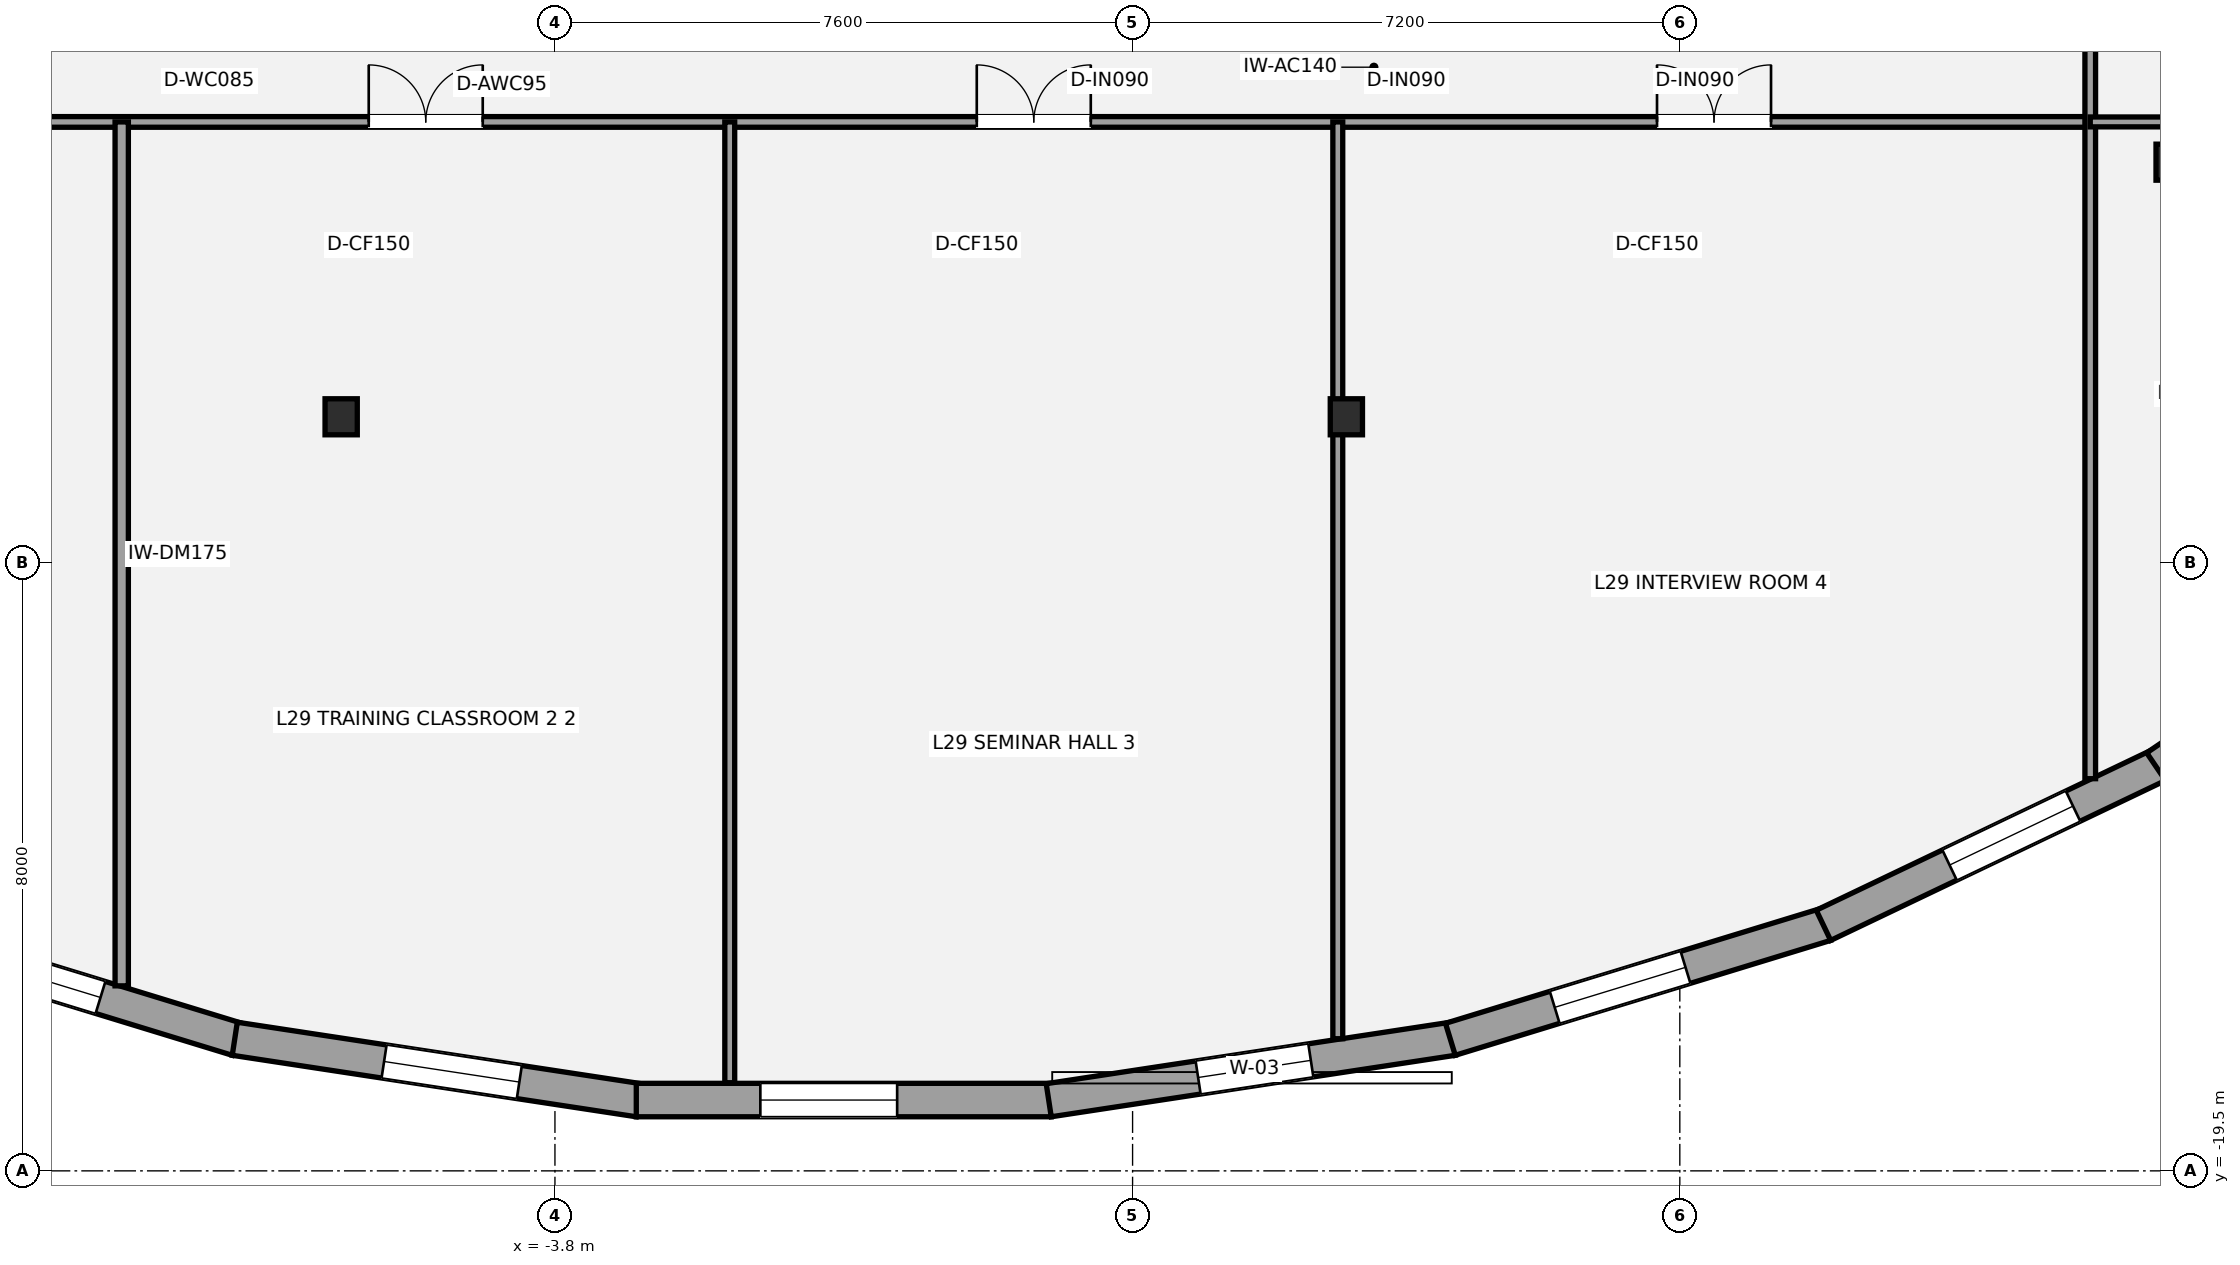
"""IFC4 building model, lengths in metres.
Left out: names, types, materials, properties, quantities, classifications, styles, units other than length and angle.
Written with IfcOpenShell. Run it as: python <this file> out.ifc"""

import sys

from ifc_helpers import new_model, si_unit, direction, frame, frame_2d, origin, origin_2d, place, context, subcontext, project, spatial, rectangle, i_section, extrude, element, fill, save


model = new_model("IFC4")
c1 = context("Model", 3, precision=1e-05, world=origin(), true_north=direction((0.0, 1.0)))
c2 = subcontext(c1, "Body", "Model", "MODEL_VIEW")
j1 = project(units=[si_unit("LENGTHUNIT", "METRE"), si_unit("PLANEANGLEUNIT", "RADIAN")], contexts=[c1])
p1 = place(None, origin())
s1 = spatial("IfcSite", under=j1, at=p1, CompositionType="ELEMENT")
p2 = place(p1, origin())
s2 = spatial("IfcBuilding", under=s1, at=p2, CompositionType="ELEMENT")
p3 = place(p2, frame((0.0, 0.0, 110.6)))
s3 = spatial("IfcBuildingStorey", under=s2, at=p3, CompositionType="ELEMENT", Elevation=110.6)
for number, where, z_axis, x_axis in (
    (1, (-6.613, -9.579, 0.0), (0.0, 0.0, 1.0), (1.0, 0.0, 0.0)),
    (2, (6.613, -9.579, 0.0), (0.0, 0.0, 1.0), (1.0, 0.0, 0.0)),
    (3, (17.477, -6.229, 0.0), (0.0, 0.0, 1.0), (1.0, 0.0, 0.0)),
):
    element("IfcColumn", number, at=place(p3, frame(where, z_axis=z_axis, x_axis=x_axis)), inside=s3, PredefinedType="COLUMN", context=c2, shape_type="SweptSolid", body=[
        extrude(i_section(OverallWidth=0.424, OverallDepth=0.474, WebThickness=0.048, FlangeThickness=0.077, at=origin_2d()), origin(), (0.0, 0.0, 1.0), 3.5),
    ])
p4 = place(p3, frame((-7.981, -17.769, 0.0), z_axis=(0.0, 0.0, 1.0), x_axis=(-0.956228569431, 0.292620783617, 0.0)))
e4 = element("IfcWall", 4, at=p4, inside=s3, PredefinedType="STANDARD", context=c2, shape_type="SweptSolid", body=[
    extrude(rectangle(XDim=5.165, YDim=0.44, at=frame_2d((2.583, 0.0))), origin(), (0.0, 0.0, 1.0), 2.528),
])
p5 = place(p4, frame((1.88, 0.0, 0.65)))
e5 = element("IfcOpeningElement", 5, at=p5, cuts=e4, PredefinedType="OPENING", context=c2, shape_type="SweptSolid", body=[
    extrude(rectangle(XDim=1.8, YDim=1.7, at=frame_2d((0.9, 0.85))), frame((0.0, 0.23, 0.0), z_axis=(0.0, -1.0, 0.0), x_axis=(1.0, 0.0, 0.0)), (0.0, 0.0, 1.0), 0.46),
])
p6 = place(p3, frame((-2.697, -18.571, 0.0), z_axis=(0.0, 0.0, 1.0), x_axis=(-0.988627497469, 0.150385076545, 0.0)))
e6 = element("IfcWall", 6, at=p6, inside=s3, PredefinedType="STANDARD", context=c2, shape_type="SweptSolid", body=[
    extrude(rectangle(XDim=5.377, YDim=0.44, at=frame_2d((2.688, 0.0))), origin(), (0.0, 0.0, 1.0), 2.528),
])
p7 = place(p6, frame((1.59, 0.0, 0.65)))
e7 = element("IfcOpeningElement", 7, at=p7, cuts=e6, PredefinedType="OPENING", context=c2, shape_type="SweptSolid", body=[
    extrude(rectangle(XDim=1.8, YDim=1.7, at=frame_2d((0.9, 0.85))), frame((0.0, 0.23, 0.0), z_axis=(0.0, -1.0, 0.0), x_axis=(1.0, 0.0, 0.0)), (0.0, 0.0, 1.0), 0.46),
])
p8 = place(p3, frame((2.73, -18.568, 0.0), z_axis=(0.0, 0.0, 1.0), x_axis=(-1.0, 0.0, 0.0)))
e8 = element("IfcWall", 8, at=p8, inside=s3, PredefinedType="STANDARD", context=c2, shape_type="SweptSolid", body=[
    extrude(rectangle(XDim=5.459, YDim=0.44, at=frame_2d((2.73, 0.0))), origin(), (0.0, 0.0, 1.0), 2.528),
])
p9 = place(p8, frame((2.027, 0.0, 0.65)))
e9 = element("IfcOpeningElement", 9, at=p9, cuts=e8, PredefinedType="OPENING", context=c2, shape_type="SweptSolid", body=[
    extrude(rectangle(XDim=1.8, YDim=1.7, at=frame_2d((0.9, 0.85))), frame((0.0, 0.23, 0.0), z_axis=(0.0, -1.0, 0.0), x_axis=(1.0, 0.0, 0.0)), (0.0, 0.0, 1.0), 0.46),
])
p10 = place(p3, frame((8.012, -17.762, 0.0), z_axis=(0.0, 0.0, 1.0), x_axis=(-0.988627497469, -0.150385076545, 0.0)))
e10 = element("IfcWall", 10, at=p10, inside=s3, PredefinedType="STANDARD", context=c2, shape_type="SweptSolid", body=[
    extrude(rectangle(XDim=5.377, YDim=0.44, at=frame_2d((2.688, 0.0))), origin(), (0.0, 0.0, 1.0), 2.528),
])
p11 = place(p10, frame((1.889, 0.0, 0.65)))
e11 = element("IfcOpeningElement", 11, at=p11, cuts=e10, PredefinedType="OPENING", context=c2, shape_type="SweptSolid", body=[
    extrude(rectangle(XDim=1.5, YDim=1.7, at=frame_2d((0.75, 0.85))), frame((0.0, 0.23, 0.0), z_axis=(0.0, -1.0, 0.0), x_axis=(1.0, 0.0, 0.0)), (0.0, 0.0, 1.0), 0.46),
])
p12 = place(p3, frame((12.92, -16.258, 0.0), z_axis=(0.0, 0.0, 1.0), x_axis=(-0.956228569431, -0.292620783617, 0.0)))
e12 = element("IfcWall", 12, at=p12, inside=s3, PredefinedType="STANDARD", context=c2, shape_type="SweptSolid", body=[
    extrude(rectangle(XDim=5.165, YDim=0.44, at=frame_2d((2.583, 0.0))), origin(), (0.0, 0.0, 1.0), 2.528),
])
p13 = place(p12, frame((1.93, 0.0, 0.65)))
e13 = element("IfcOpeningElement", 13, at=p13, cuts=e12, PredefinedType="OPENING", context=c2, shape_type="SweptSolid", body=[
    extrude(rectangle(XDim=1.8, YDim=1.7, at=frame_2d((0.9, 0.85))), frame((0.0, 0.23, 0.0), z_axis=(0.0, -1.0, 0.0), x_axis=(1.0, 0.0, 0.0)), (0.0, 0.0, 1.0), 0.46),
])
p14 = place(p3, frame((17.295, -14.166, 0.0), z_axis=(0.0, 0.0, 1.0), x_axis=(-0.902372757907, -0.430956385018, 0.0)))
e14 = element("IfcWall", 14, at=p14, inside=s3, PredefinedType="STANDARD", context=c2, shape_type="SweptSolid", body=[
    extrude(rectangle(XDim=4.882, YDim=0.44, at=frame_2d((2.441, 0.0))), origin(), (0.0, 0.0, 1.0), 2.528),
])
p15 = place(p14, frame((1.243, 0.0, 0.65)))
e15 = element("IfcOpeningElement", 15, at=p15, cuts=e14, PredefinedType="OPENING", context=c2, shape_type="SweptSolid", body=[
    extrude(rectangle(XDim=1.8, YDim=1.7, at=frame_2d((0.9, 0.85))), frame((0.0, 0.23, 0.0), z_axis=(0.0, -1.0, 0.0), x_axis=(1.0, 0.0, 0.0)), (0.0, 0.0, 1.0), 0.46),
])
p16 = place(p3, frame((21.066, -11.606, 0.0), z_axis=(0.0, 0.0, 1.0), x_axis=(-0.827754551165, -0.56109036975, 0.0)))
e16 = element("IfcWall", 16, at=p16, inside=s3, PredefinedType="STANDARD", context=c2, shape_type="SweptSolid", body=[
    extrude(rectangle(XDim=4.591, YDim=0.44, at=frame_2d((2.295, 0.0))), origin(), (0.0, 0.0, 1.0), 2.528),
])
p17 = place(p16, frame((1.794, 0.0, 0.65)))
e17 = element("IfcOpeningElement", 17, at=p17, cuts=e16, PredefinedType="OPENING", context=c2, shape_type="SweptSolid", body=[
    extrude(rectangle(XDim=1.8, YDim=1.7, at=frame_2d((0.9, 0.85))), frame((0.0, 0.23, 0.0), z_axis=(0.0, -1.0, 0.0), x_axis=(1.0, 0.0, 0.0)), (0.0, 0.0, 1.0), 0.46),
])
p18 = place(p3, frame((-17.8, -5.7, 0.0), z_axis=(0.0, 0.0, 1.0), x_axis=(1.0, 0.0, 0.0)))
e18 = element("IfcWall", 18, at=p18, inside=s3, PredefinedType="PARTITIONING", context=c2, shape_type="SweptSolid", body=[
    extrude(rectangle(XDim=34.2, YDim=0.14, at=frame_2d((17.1, 0.0))), origin(), (0.0, 0.0, 1.0), 2.688),
])
p19 = place(p18, frame((3.4, 0.0, 0.0)))
e19 = element("IfcOpeningElement", 19, at=p19, cuts=e18, PredefinedType="OPENING", context=c2, shape_type="SweptSolid", body=[
    extrude(rectangle(XDim=1.5, YDim=2.15, at=frame_2d((0.75, 1.075))), frame((0.0, 0.08, 0.0), z_axis=(0.0, -1.0, 0.0), x_axis=(1.0, 0.0, 0.0)), (0.0, 0.0, 1.0), 0.16),
])
p20 = place(p18, frame((11.55, 0.0, 0.0)))
e20 = element("IfcOpeningElement", 20, at=p20, cuts=e18, PredefinedType="OPENING", context=c2, shape_type="SweptSolid", body=[
    extrude(rectangle(XDim=1.5, YDim=2.15, at=frame_2d((0.75, 1.075))), frame((0.0, 0.08, 0.0), z_axis=(0.0, -1.0, 0.0), x_axis=(1.0, 0.0, 0.0)), (0.0, 0.0, 1.0), 0.16),
])
p21 = place(p18, frame((19.55, 0.0, 0.0)))
e21 = element("IfcOpeningElement", 21, at=p21, cuts=e18, PredefinedType="OPENING", context=c2, shape_type="SweptSolid", body=[
    extrude(rectangle(XDim=1.5, YDim=2.15, at=frame_2d((0.75, 1.075))), frame((0.0, 0.08, 0.0), z_axis=(0.0, -1.0, 0.0), x_axis=(1.0, 0.0, 0.0)), (0.0, 0.0, 1.0), 0.16),
])
p22 = place(p18, frame((28.5, 0.0, 0.0)))
e22 = element("IfcOpeningElement", 22, at=p22, cuts=e18, PredefinedType="OPENING", context=c2, shape_type="SweptSolid", body=[
    extrude(rectangle(XDim=1.5, YDim=2.15, at=frame_2d((0.75, 1.075))), frame((0.0, 0.08, 0.0), z_axis=(0.0, -1.0, 0.0), x_axis=(1.0, 0.0, 0.0)), (0.0, 0.0, 1.0), 0.16),
])
p23 = place(p3, frame((16.4, -14.341, 0.0), z_axis=(0.0, 0.0, 1.0), x_axis=(0.0, 1.0, 0.0)))
e23 = element("IfcWall", 23, at=p23, inside=s3, PredefinedType="PARTITIONING", context=c2, shape_type="SweptSolid", body=[
    extrude(rectangle(XDim=21.891, YDim=0.14, at=frame_2d((10.945, 0.0))), origin(), (0.0, 0.0, 1.0), 2.763),
])
p24 = place(p23, frame((11.44, 0.0, 0.0)))
e24 = element("IfcOpeningElement", 24, at=p24, cuts=e23, PredefinedType="OPENING", context=c2, shape_type="SweptSolid", body=[
    extrude(rectangle(XDim=0.9, YDim=2.1, at=frame_2d((0.45, 1.05))), frame((0.0, 0.08, 0.0), z_axis=(0.0, -1.0, 0.0), x_axis=(1.0, 0.0, 0.0)), (0.0, 0.0, 1.0), 0.16),
])
p25 = place(p23, frame((16.59, 0.0, 0.0)))
e25 = element("IfcOpeningElement", 25, at=p25, cuts=e23, PredefinedType="OPENING", context=c2, shape_type="SweptSolid", body=[
    extrude(rectangle(XDim=0.9, YDim=2.1, at=frame_2d((0.45, 1.05))), frame((0.0, 0.08, 0.0), z_axis=(0.0, -1.0, 0.0), x_axis=(1.0, 0.0, 0.0)), (0.0, 0.0, 1.0), 0.16),
])
p26 = place(p23, frame((19.965, 0.0, 0.0)))
e26 = element("IfcOpeningElement", 26, at=p26, cuts=e23, PredefinedType="OPENING", context=c2, shape_type="SweptSolid", body=[
    extrude(rectangle(XDim=0.9, YDim=2.1, at=frame_2d((0.45, 1.05))), frame((0.0, 0.08, 0.0), z_axis=(0.0, -1.0, 0.0), x_axis=(1.0, 0.0, 0.0)), (0.0, 0.0, 1.0), 0.16),
])
p27 = place(p3, frame((-9.5, -17.066, 0.0), z_axis=(0.0, 0.0, 1.0), x_axis=(0.0, 1.0, 0.0)))
e27 = element("IfcWall", 27, at=p27, inside=s3, PredefinedType="PARTITIONING", context=c2, shape_type="SweptSolid", body=[
    extrude(rectangle(XDim=11.366, YDim=0.175, at=frame_2d((5.683, 0.0))), origin(), (0.0, 0.0, 1.0), 2.763),
])
p28 = place(p3, frame((-1.5, -18.34, 0.0), z_axis=(0.0, 0.0, 1.0), x_axis=(0.0, 1.0, 0.0)))
e28 = element("IfcWall", 28, at=p28, inside=s3, PredefinedType="PARTITIONING", context=c2, shape_type="SweptSolid", body=[
    extrude(rectangle(XDim=12.64, YDim=0.13, at=frame_2d((6.32, 0.0))), origin(), (0.0, 0.0, 1.0), 2.763),
])
p29 = place(p3, frame((6.5, -17.762, 0.0), z_axis=(0.0, 0.0, 1.0), x_axis=(0.0, 1.0, 0.0)))
e29 = element("IfcWall", 29, at=p29, inside=s3, PredefinedType="PARTITIONING", context=c2, shape_type="SweptSolid", body=[
    extrude(rectangle(XDim=12.062, YDim=0.13, at=frame_2d((6.031, 0.0))), origin(), (0.0, 0.0, 1.0), 2.763),
])
p30 = place(p3, frame((16.4, -5.7, 0.0), z_axis=(0.0, 0.0, 1.0), x_axis=(1.0, 0.0, 0.0)))
e30 = element("IfcWall", 30, at=p30, inside=s3, PredefinedType="PARTITIONING", context=c2, shape_type="SweptSolid", body=[
    extrude(rectangle(XDim=9.421, YDim=0.13, at=frame_2d((4.71, 0.0))), origin(), (0.0, 0.0, 1.0), 2.688),
])
p31 = place(p30, frame((1.49, 0.0, 0.0)))
e31 = element("IfcOpeningElement", 31, at=p31, cuts=e30, PredefinedType="OPENING", context=c2, shape_type="SweptSolid", body=[
    extrude(rectangle(XDim=0.9, YDim=2.1, at=frame_2d((0.45, 1.05))), frame((0.0, 0.075, 0.0), z_axis=(0.0, -1.0, 0.0), x_axis=(1.0, 0.0, 0.0)), (0.0, 0.0, 1.0), 0.15),
])
p32 = place(p5, origin())
e32 = element("IfcWindow", 32, at=p32, inside=s3, PartitioningType="SINGLE_PANEL", PredefinedType="WINDOW", context=c2, shape_type="SweptSolid", body=[
    extrude(rectangle(XDim=1.8, YDim=1.7, at=frame_2d((0.9, 0.85))), frame((0.0, -0.01, 0.0), z_axis=(0.0, -1.0, 0.0), x_axis=(1.0, 0.0, 0.0)), (0.0, 0.0, 1.0), 0.06),
])
fill(e5, e32)
p33 = place(p7, origin())
e33 = element("IfcWindow", 33, at=p33, inside=s3, PartitioningType="SINGLE_PANEL", PredefinedType="WINDOW", context=c2, shape_type="SweptSolid", body=[
    extrude(rectangle(XDim=1.8, YDim=1.7, at=frame_2d((0.9, 0.85))), frame((0.0, -0.01, 0.0), z_axis=(0.0, -1.0, 0.0), x_axis=(1.0, 0.0, 0.0)), (0.0, 0.0, 1.0), 0.06),
])
fill(e7, e33)
p34 = place(p9, origin())
e34 = element("IfcWindow", 34, at=p34, inside=s3, PartitioningType="SINGLE_PANEL", PredefinedType="WINDOW", context=c2, shape_type="SweptSolid", body=[
    extrude(rectangle(XDim=1.8, YDim=1.7, at=frame_2d((0.9, 0.85))), frame((0.0, -0.01, 0.0), z_axis=(0.0, -1.0, 0.0), x_axis=(1.0, 0.0, 0.0)), (0.0, 0.0, 1.0), 0.06),
])
fill(e9, e34)
p35 = place(p11, origin())
e35 = element("IfcWindow", 35, at=p35, inside=s3, PartitioningType="SINGLE_PANEL", PredefinedType="WINDOW", context=c2, shape_type="SweptSolid", body=[
    extrude(rectangle(XDim=1.5, YDim=1.7, at=frame_2d((0.75, 0.85))), frame((0.0, -0.01, 0.0), z_axis=(0.0, -1.0, 0.0), x_axis=(1.0, 0.0, 0.0)), (0.0, 0.0, 1.0), 0.06),
])
fill(e11, e35)
p36 = place(p13, origin())
e36 = element("IfcWindow", 36, at=p36, inside=s3, PartitioningType="SINGLE_PANEL", PredefinedType="WINDOW", context=c2, shape_type="SweptSolid", body=[
    extrude(rectangle(XDim=1.8, YDim=1.7, at=frame_2d((0.9, 0.85))), frame((0.0, -0.01, 0.0), z_axis=(0.0, -1.0, 0.0), x_axis=(1.0, 0.0, 0.0)), (0.0, 0.0, 1.0), 0.06),
])
fill(e13, e36)
p37 = place(p15, origin())
e37 = element("IfcWindow", 37, at=p37, inside=s3, PartitioningType="SINGLE_PANEL", PredefinedType="WINDOW", context=c2, shape_type="SweptSolid", body=[
    extrude(rectangle(XDim=1.8, YDim=1.7, at=frame_2d((0.9, 0.85))), frame((0.0, -0.01, 0.0), z_axis=(0.0, -1.0, 0.0), x_axis=(1.0, 0.0, 0.0)), (0.0, 0.0, 1.0), 0.06),
])
fill(e15, e37)
p38 = place(p20, origin())
e38 = element("IfcDoor", 38, at=p38, inside=s3, OperationType="DOUBLE_DOOR_SINGLE_SWING", PredefinedType="DOOR", context=c2, shape_type="SweptSolid", body=[
    extrude(rectangle(XDim=1.5, YDim=2.15, at=frame_2d((0.75, 1.075))), frame((0.0, 0.025, 0.0), z_axis=(0.0, -1.0, 0.0), x_axis=(1.0, 0.0, 0.0)), (0.0, 0.0, 1.0), 0.05),
])
fill(e20, e38)
p39 = place(p21, origin())
e39 = element("IfcDoor", 39, at=p39, inside=s3, OperationType="DOUBLE_DOOR_SINGLE_SWING", PredefinedType="DOOR", context=c2, shape_type="SweptSolid", body=[
    extrude(rectangle(XDim=1.5, YDim=2.15, at=frame_2d((0.75, 1.075))), frame((0.0, 0.025, 0.0), z_axis=(0.0, -1.0, 0.0), x_axis=(1.0, 0.0, 0.0)), (0.0, 0.0, 1.0), 0.05),
])
fill(e21, e39)
p40 = place(p22, origin())
e40 = element("IfcDoor", 40, at=p40, inside=s3, OperationType="DOUBLE_DOOR_SINGLE_SWING", PredefinedType="DOOR", context=c2, shape_type="SweptSolid", body=[
    extrude(rectangle(XDim=1.5, YDim=2.15, at=frame_2d((0.75, 1.075))), frame((0.0, 0.025, 0.0), z_axis=(0.0, -1.0, 0.0), x_axis=(1.0, 0.0, 0.0)), (0.0, 0.0, 1.0), 0.05),
])
fill(e22, e40)
save(model, sys.argv[1])
